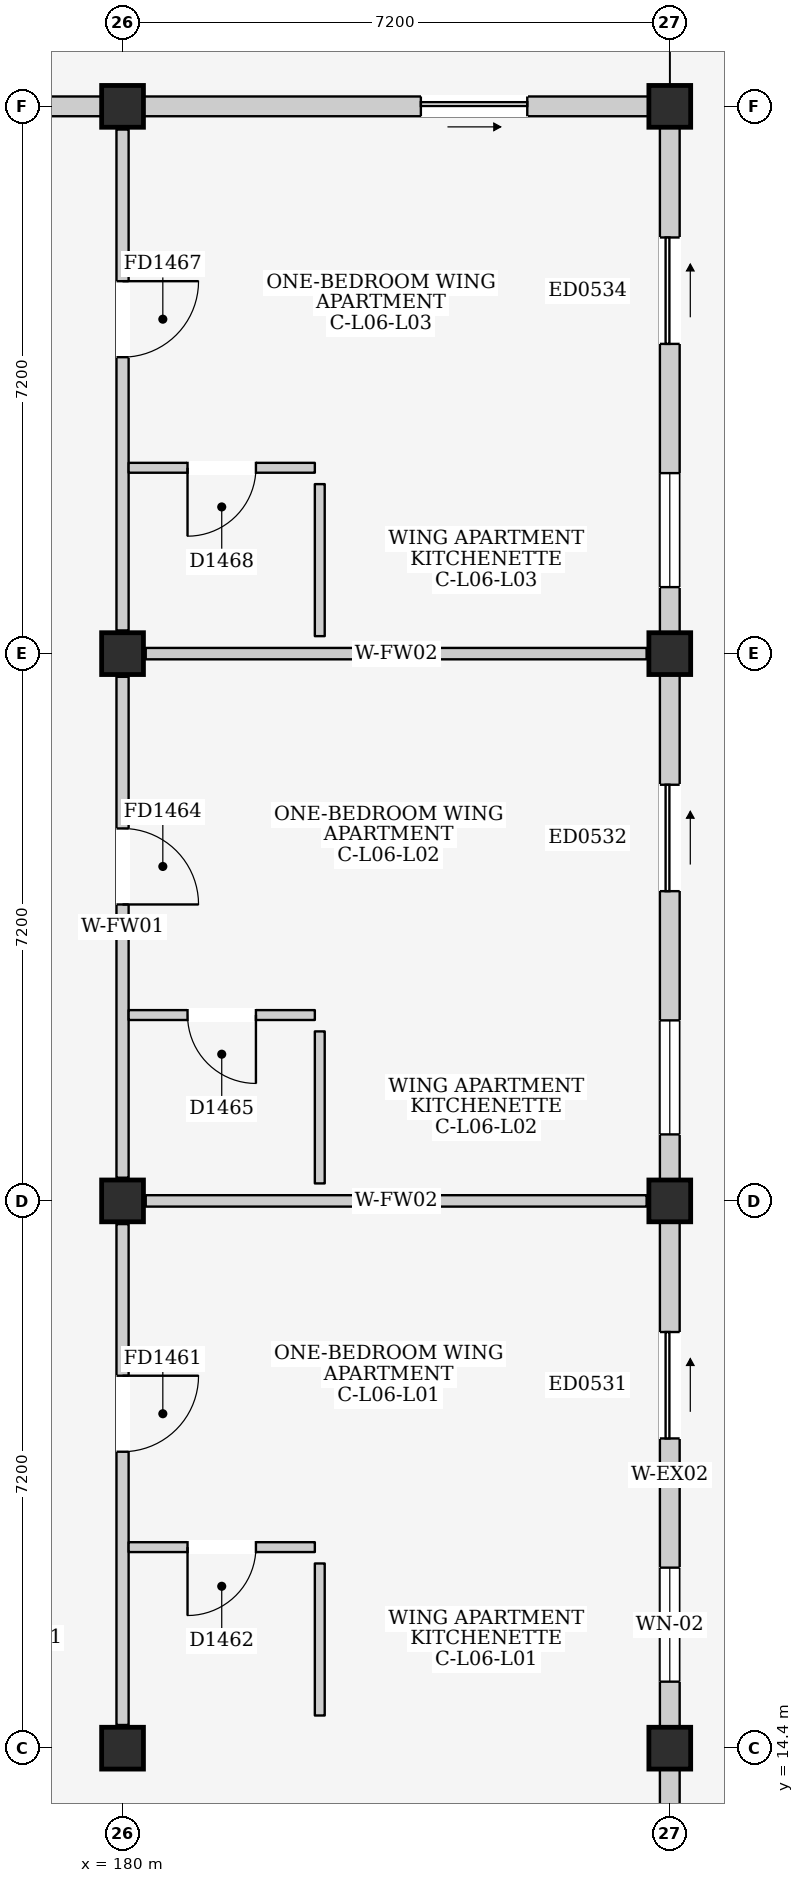
"""IFC4 building model, lengths in metres.
Left out: names, types, materials, properties, quantities, classifications, styles, units other than length and angle.
Written with IfcOpenShell. Run it as: python <this file> out.ifc"""

import sys

from ifc_helpers import new_model, si_unit, direction, frame, frame_2d, origin, origin_2d, place, context, subcontext, project, spatial, rectangle, extrude, element, fill, save


model = new_model("IFC4")
c1 = context("Model", 3, precision=1e-05, world=origin(), true_north=direction((0.0, 1.0)))
c2 = subcontext(c1, "Body", "Model", "MODEL_VIEW")
j1 = project(units=[si_unit("LENGTHUNIT", "METRE"), si_unit("PLANEANGLEUNIT", "RADIAN")], contexts=[c1])
p1 = place(None, origin())
s1 = spatial("IfcSite", under=j1, at=p1, CompositionType="ELEMENT")
p2 = place(p1, origin())
s2 = spatial("IfcBuilding", under=s1, at=p2, CompositionType="ELEMENT")
p3 = place(p2, frame((0.0, 0.0, 21.9)))
s3 = spatial("IfcBuildingStorey", under=s2, at=p3, CompositionType="ELEMENT", Elevation=21.9)
for number, where, z_axis, x_axis in (
    (1, (180.0, 14.4, 0.0), (0.0, 0.0, 1.0), (1.0, 0.0, 0.0)),
    (2, (180.0, 21.6, 0.0), (0.0, 0.0, 1.0), (1.0, 0.0, 0.0)),
    (3, (180.0, 28.8, 0.0), (0.0, 0.0, 1.0), (1.0, 0.0, 0.0)),
    (4, (180.0, 36.0, 0.0), (0.0, 0.0, 1.0), (1.0, 0.0, 0.0)),
    (5, (187.2, 14.4, 0.0), (0.0, 0.0, 1.0), (1.0, 0.0, 0.0)),
    (6, (187.2, 21.6, 0.0), (0.0, 0.0, 1.0), (1.0, 0.0, 0.0)),
    (7, (187.2, 28.8, 0.0), (0.0, 0.0, 1.0), (1.0, 0.0, 0.0)),
    (8, (187.2, 36.0, 0.0), (0.0, 0.0, 1.0), (1.0, 0.0, 0.0)),
):
    element("IfcColumn", number, at=place(p3, frame(where, z_axis=z_axis, x_axis=x_axis)), inside=s3, PredefinedType="COLUMN", context=c2, shape_type="SweptSolid", body=[
        extrude(rectangle(XDim=0.55, YDim=0.55, at=origin_2d()), origin(), (0.0, 0.0, 1.0), 3.2),
    ])
p4 = place(p3, frame((173.075, 36.0, 0.0), z_axis=(0.0, 0.0, 1.0), x_axis=(1.0, 0.0, 0.0)))
e9 = element("IfcWall", 9, at=p4, inside=s3, PredefinedType="ELEMENTEDWALL", context=c2, shape_type="SweptSolid", body=[
    extrude(rectangle(XDim=6.65, YDim=0.26, at=frame_2d((3.325, 0.0))), origin(), (0.0, 0.0, 1.0), 2.365),
])
p5 = place(p4, frame((2.825, 0.0, 1.1)))
e10 = element("IfcOpeningElement", 10, at=p5, cuts=e9, PredefinedType="OPENING", context=c2, shape_type="SweptSolid", body=[
    extrude(rectangle(XDim=1.0, YDim=0.9, at=frame_2d((0.5, 0.45))), frame((0.0, 0.145, 0.0), z_axis=(0.0, -1.0, 0.0), x_axis=(1.0, 0.0, 0.0)), (0.0, 0.0, 1.0), 0.29),
])
p6 = place(p3, frame((187.2, 7.475, 0.0), z_axis=(0.0, 0.0, 1.0), x_axis=(0.0, 1.0, 0.0)))
e11 = element("IfcWall", 11, at=p6, inside=s3, PredefinedType="ELEMENTEDWALL", context=c2, shape_type="SweptSolid", body=[
    extrude(rectangle(XDim=6.65, YDim=0.26, at=frame_2d((3.325, 0.0))), origin(), (0.0, 0.0, 1.0), 2.515),
])
p7 = place(p6, frame((3.65, 0.0, 0.0)))
e12 = element("IfcOpeningElement", 12, at=p7, cuts=e11, PredefinedType="OPENING", context=c2, shape_type="SweptSolid", body=[
    extrude(rectangle(XDim=1.4, YDim=2.1, at=frame_2d((0.7, 1.05))), frame((0.0, 0.145, 0.0), z_axis=(0.0, -1.0, 0.0), x_axis=(1.0, 0.0, 0.0)), (0.0, 0.0, 1.0), 0.29),
])
p8 = place(p3, frame((187.2, 14.675, 0.0), z_axis=(0.0, 0.0, 1.0), x_axis=(0.0, 1.0, 0.0)))
e13 = element("IfcWall", 13, at=p8, inside=s3, PredefinedType="ELEMENTEDWALL", context=c2, shape_type="SweptSolid", body=[
    extrude(rectangle(XDim=6.65, YDim=0.26, at=frame_2d((3.325, 0.0))), origin(), (0.0, 0.0, 1.0), 2.515),
])
p9 = place(p8, frame((3.8, 0.0, 0.0)))
e14 = element("IfcOpeningElement", 14, at=p9, cuts=e13, PredefinedType="OPENING", context=c2, shape_type="SweptSolid", body=[
    extrude(rectangle(XDim=1.4, YDim=2.1, at=frame_2d((0.7, 1.05))), frame((0.0, 0.145, 0.0), z_axis=(0.0, -1.0, 0.0), x_axis=(1.0, 0.0, 0.0)), (0.0, 0.0, 1.0), 0.29),
])
p10 = place(p8, frame((0.6, 0.0, 0.905)))
e15 = element("IfcOpeningElement", 15, at=p10, cuts=e13, PredefinedType="OPENING", context=c2, shape_type="SweptSolid", body=[
    extrude(rectangle(XDim=1.5, YDim=1.5, at=frame_2d((0.75, 0.75))), frame((0.0, 0.145, 0.0), z_axis=(0.0, -1.0, 0.0), x_axis=(1.0, 0.0, 0.0)), (0.0, 0.0, 1.0), 0.29),
])
p11 = place(p3, frame((187.2, 21.875, 0.0), z_axis=(0.0, 0.0, 1.0), x_axis=(0.0, 1.0, 0.0)))
e16 = element("IfcWall", 16, at=p11, inside=s3, PredefinedType="ELEMENTEDWALL", context=c2, shape_type="SweptSolid", body=[
    extrude(rectangle(XDim=6.65, YDim=0.26, at=frame_2d((3.325, 0.0))), origin(), (0.0, 0.0, 1.0), 2.515),
])
p12 = place(p11, frame((3.8, 0.0, 0.0)))
e17 = element("IfcOpeningElement", 17, at=p12, cuts=e16, PredefinedType="OPENING", context=c2, shape_type="SweptSolid", body=[
    extrude(rectangle(XDim=1.4, YDim=2.1, at=frame_2d((0.7, 1.05))), frame((0.0, 0.145, 0.0), z_axis=(0.0, -1.0, 0.0), x_axis=(1.0, 0.0, 0.0)), (0.0, 0.0, 1.0), 0.29),
])
p13 = place(p11, frame((0.6, 0.0, 0.905)))
e18 = element("IfcOpeningElement", 18, at=p13, cuts=e16, PredefinedType="OPENING", context=c2, shape_type="SweptSolid", body=[
    extrude(rectangle(XDim=1.5, YDim=1.5, at=frame_2d((0.75, 0.75))), frame((0.0, 0.145, 0.0), z_axis=(0.0, -1.0, 0.0), x_axis=(1.0, 0.0, 0.0)), (0.0, 0.0, 1.0), 0.29),
])
p14 = place(p3, frame((180.275, 36.0, 0.0), z_axis=(0.0, 0.0, 1.0), x_axis=(1.0, 0.0, 0.0)))
e19 = element("IfcWall", 19, at=p14, inside=s3, PredefinedType="ELEMENTEDWALL", context=c2, shape_type="SweptSolid", body=[
    extrude(rectangle(XDim=6.65, YDim=0.26, at=frame_2d((3.325, 0.0))), origin(), (0.0, 0.0, 1.0), 2.365),
])
p15 = place(p14, frame((3.65, 0.0, 0.0)))
e20 = element("IfcOpeningElement", 20, at=p15, cuts=e19, PredefinedType="OPENING", context=c2, shape_type="SweptSolid", body=[
    extrude(rectangle(XDim=1.4, YDim=2.1, at=frame_2d((0.7, 1.05))), frame((0.0, 0.145, 0.0), z_axis=(0.0, -1.0, 0.0), x_axis=(1.0, 0.0, 0.0)), (0.0, 0.0, 1.0), 0.29),
])
p16 = place(p3, frame((187.2, 29.075, 0.0), z_axis=(0.0, 0.0, 1.0), x_axis=(0.0, 1.0, 0.0)))
e21 = element("IfcWall", 21, at=p16, inside=s3, PredefinedType="ELEMENTEDWALL", context=c2, shape_type="SweptSolid", body=[
    extrude(rectangle(XDim=6.65, YDim=0.26, at=frame_2d((3.325, 0.0))), origin(), (0.0, 0.0, 1.0), 2.515),
])
p17 = place(p16, frame((3.8, 0.0, 0.0)))
e22 = element("IfcOpeningElement", 22, at=p17, cuts=e21, PredefinedType="OPENING", context=c2, shape_type="SweptSolid", body=[
    extrude(rectangle(XDim=1.4, YDim=2.1, at=frame_2d((0.7, 1.05))), frame((0.0, 0.145, 0.0), z_axis=(0.0, -1.0, 0.0), x_axis=(1.0, 0.0, 0.0)), (0.0, 0.0, 1.0), 0.29),
])
p18 = place(p16, frame((0.6, 0.0, 0.905)))
e23 = element("IfcOpeningElement", 23, at=p18, cuts=e21, PredefinedType="OPENING", context=c2, shape_type="SweptSolid", body=[
    extrude(rectangle(XDim=1.5, YDim=1.5, at=frame_2d((0.75, 0.75))), frame((0.0, 0.145, 0.0), z_axis=(0.0, -1.0, 0.0), x_axis=(1.0, 0.0, 0.0)), (0.0, 0.0, 1.0), 0.29),
])
p19 = place(p3, frame((180.0, 14.705, 0.0), z_axis=(0.0, 0.0, 1.0), x_axis=(0.0, 1.0, 0.0)))
e24 = element("IfcWall", 24, at=p19, inside=s3, PredefinedType="PARTITIONING", context=c2, shape_type="SweptSolid", body=[
    extrude(rectangle(XDim=6.59, YDim=0.16, at=frame_2d((3.295, 0.0))), origin(), (0.0, 0.0, 1.0), 2.465),
])
p20 = place(p19, frame((3.595, 0.0, 0.0)))
e25 = element("IfcOpeningElement", 25, at=p20, cuts=e24, PredefinedType="OPENING", context=c2, shape_type="SweptSolid", body=[
    extrude(rectangle(XDim=1.0, YDim=2.15, at=frame_2d((0.5, 1.075))), frame((0.0, 0.095, 0.0), z_axis=(0.0, -1.0, 0.0), x_axis=(1.0, 0.0, 0.0)), (0.0, 0.0, 1.0), 0.19),
])
p21 = place(p3, frame((180.305, 21.6, 0.0), z_axis=(0.0, 0.0, 1.0), x_axis=(1.0, 0.0, 0.0)))
e26 = element("IfcWall", 26, at=p21, inside=s3, PredefinedType="PARTITIONING", context=c2, shape_type="SweptSolid", body=[
    extrude(rectangle(XDim=6.59, YDim=0.15, at=frame_2d((3.295, 0.0))), origin(), (0.0, 0.0, 1.0), 2.365),
])
p22 = place(p3, frame((180.08, 17.045, 0.0), z_axis=(0.0, 0.0, 1.0), x_axis=(1.0, 0.0, 0.0)))
e27 = element("IfcWall", 27, at=p22, inside=s3, PredefinedType="PARTITIONING", context=c2, shape_type="SweptSolid", body=[
    extrude(rectangle(XDim=2.45, YDim=0.13, at=frame_2d((1.225, 0.0))), origin(), (0.0, 0.0, 1.0), 2.98),
])
p23 = place(p22, frame((0.775, 0.0, 0.0)))
e28 = element("IfcOpeningElement", 28, at=p23, cuts=e27, PredefinedType="OPENING", context=c2, shape_type="SweptSolid", body=[
    extrude(rectangle(XDim=0.9, YDim=2.1, at=frame_2d((0.45, 1.05))), frame((0.0, 0.08, 0.0), z_axis=(0.0, -1.0, 0.0), x_axis=(1.0, 0.0, 0.0)), (0.0, 0.0, 1.0), 0.16),
])
p24 = place(p3, frame((182.595, 14.83, 0.0), z_axis=(0.0, 0.0, 1.0), x_axis=(0.0, 1.0, 0.0)))
e29 = element("IfcWall", 29, at=p24, inside=s3, PredefinedType="PARTITIONING", context=c2, shape_type="SweptSolid", body=[
    extrude(rectangle(XDim=2.0, YDim=0.13, at=frame_2d((1.0, 0.0))), origin(), (0.0, 0.0, 1.0), 2.98),
])
p25 = place(p3, frame((180.0, 21.905, 0.0), z_axis=(0.0, 0.0, 1.0), x_axis=(0.0, 1.0, 0.0)))
e30 = element("IfcWall", 30, at=p25, inside=s3, PredefinedType="PARTITIONING", context=c2, shape_type="SweptSolid", body=[
    extrude(rectangle(XDim=6.59, YDim=0.16, at=frame_2d((3.295, 0.0))), origin(), (0.0, 0.0, 1.0), 2.465),
])
p26 = place(p25, frame((3.595, 0.0, 0.0)))
e31 = element("IfcOpeningElement", 31, at=p26, cuts=e30, PredefinedType="OPENING", context=c2, shape_type="SweptSolid", body=[
    extrude(rectangle(XDim=1.0, YDim=2.15, at=frame_2d((0.5, 1.075))), frame((0.0, 0.095, 0.0), z_axis=(0.0, -1.0, 0.0), x_axis=(1.0, 0.0, 0.0)), (0.0, 0.0, 1.0), 0.19),
])
p27 = place(p3, frame((180.305, 28.8, 0.0), z_axis=(0.0, 0.0, 1.0), x_axis=(1.0, 0.0, 0.0)))
e32 = element("IfcWall", 32, at=p27, inside=s3, PredefinedType="PARTITIONING", context=c2, shape_type="SweptSolid", body=[
    extrude(rectangle(XDim=6.59, YDim=0.15, at=frame_2d((3.295, 0.0))), origin(), (0.0, 0.0, 1.0), 2.365),
])
p28 = place(p3, frame((180.08, 24.045, 0.0), z_axis=(0.0, 0.0, 1.0), x_axis=(1.0, 0.0, 0.0)))
e33 = element("IfcWall", 33, at=p28, inside=s3, PredefinedType="PARTITIONING", context=c2, shape_type="SweptSolid", body=[
    extrude(rectangle(XDim=2.45, YDim=0.13, at=frame_2d((1.225, 0.0))), origin(), (0.0, 0.0, 1.0), 2.98),
])
p29 = place(p28, frame((0.775, 0.0, 0.0)))
e34 = element("IfcOpeningElement", 34, at=p29, cuts=e33, PredefinedType="OPENING", context=c2, shape_type="SweptSolid", body=[
    extrude(rectangle(XDim=0.9, YDim=2.1, at=frame_2d((0.45, 1.05))), frame((0.0, 0.08, 0.0), z_axis=(0.0, -1.0, 0.0), x_axis=(1.0, 0.0, 0.0)), (0.0, 0.0, 1.0), 0.16),
])
p30 = place(p3, frame((182.595, 21.83, 0.0), z_axis=(0.0, 0.0, 1.0), x_axis=(0.0, 1.0, 0.0)))
e35 = element("IfcWall", 35, at=p30, inside=s3, PredefinedType="PARTITIONING", context=c2, shape_type="SweptSolid", body=[
    extrude(rectangle(XDim=2.0, YDim=0.13, at=frame_2d((1.0, 0.0))), origin(), (0.0, 0.0, 1.0), 2.98),
])
p31 = place(p3, frame((180.0, 29.105, 0.0), z_axis=(0.0, 0.0, 1.0), x_axis=(0.0, 1.0, 0.0)))
e36 = element("IfcWall", 36, at=p31, inside=s3, PredefinedType="PARTITIONING", context=c2, shape_type="SweptSolid", body=[
    extrude(rectangle(XDim=6.59, YDim=0.16, at=frame_2d((3.295, 0.0))), origin(), (0.0, 0.0, 1.0), 2.465),
])
p32 = place(p31, frame((3.595, 0.0, 0.0)))
e37 = element("IfcOpeningElement", 37, at=p32, cuts=e36, PredefinedType="OPENING", context=c2, shape_type="SweptSolid", body=[
    extrude(rectangle(XDim=1.0, YDim=2.15, at=frame_2d((0.5, 1.075))), frame((0.0, 0.095, 0.0), z_axis=(0.0, -1.0, 0.0), x_axis=(1.0, 0.0, 0.0)), (0.0, 0.0, 1.0), 0.19),
])
p33 = place(p3, frame((180.08, 31.245, 0.0), z_axis=(0.0, 0.0, 1.0), x_axis=(1.0, 0.0, 0.0)))
e38 = element("IfcWall", 38, at=p33, inside=s3, PredefinedType="PARTITIONING", context=c2, shape_type="SweptSolid", body=[
    extrude(rectangle(XDim=2.45, YDim=0.13, at=frame_2d((1.225, 0.0))), origin(), (0.0, 0.0, 1.0), 2.98),
])
p34 = place(p33, frame((0.775, 0.0, 0.0)))
e39 = element("IfcOpeningElement", 39, at=p34, cuts=e38, PredefinedType="OPENING", context=c2, shape_type="SweptSolid", body=[
    extrude(rectangle(XDim=0.9, YDim=2.1, at=frame_2d((0.45, 1.05))), frame((0.0, 0.08, 0.0), z_axis=(0.0, -1.0, 0.0), x_axis=(1.0, 0.0, 0.0)), (0.0, 0.0, 1.0), 0.16),
])
p35 = place(p3, frame((182.595, 29.03, 0.0), z_axis=(0.0, 0.0, 1.0), x_axis=(0.0, 1.0, 0.0)))
e40 = element("IfcWall", 40, at=p35, inside=s3, PredefinedType="PARTITIONING", context=c2, shape_type="SweptSolid", body=[
    extrude(rectangle(XDim=2.0, YDim=0.13, at=frame_2d((1.0, 0.0))), origin(), (0.0, 0.0, 1.0), 2.98),
])
p36 = place(p9, frame((1.4, 0.0, 0.0), z_axis=(0.0, 0.0, 1.0), x_axis=(-1.0, 0.0, 0.0)))
e41 = element("IfcDoor", 41, at=p36, inside=s3, OperationType="SLIDING_TO_RIGHT", PredefinedType="DOOR", context=c2, shape_type="SweptSolid", body=[
    extrude(rectangle(XDim=1.4, YDim=2.1, at=frame_2d((0.7, 1.05))), frame((0.0, 0.025, 0.0), z_axis=(0.0, -1.0, 0.0), x_axis=(1.0, 0.0, 0.0)), (0.0, 0.0, 1.0), 0.05),
])
fill(e14, e41)
p37 = place(p10, origin())
e42 = element("IfcWindow", 42, at=p37, inside=s3, PartitioningType="DOUBLE_PANEL_VERTICAL", PredefinedType="WINDOW", context=c2, shape_type="SweptSolid", body=[
    extrude(rectangle(XDim=1.5, YDim=1.5, at=frame_2d((0.75, 0.75))), frame((0.0, 0.03, 0.0), z_axis=(0.0, -1.0, 0.0), x_axis=(1.0, 0.0, 0.0)), (0.0, 0.0, 1.0), 0.06),
])
fill(e15, e42)
p38 = place(p12, frame((1.4, 0.0, 0.0), z_axis=(0.0, 0.0, 1.0), x_axis=(-1.0, 0.0, 0.0)))
e43 = element("IfcDoor", 43, at=p38, inside=s3, OperationType="SLIDING_TO_RIGHT", PredefinedType="DOOR", context=c2, shape_type="SweptSolid", body=[
    extrude(rectangle(XDim=1.4, YDim=2.1, at=frame_2d((0.7, 1.05))), frame((0.0, 0.025, 0.0), z_axis=(0.0, -1.0, 0.0), x_axis=(1.0, 0.0, 0.0)), (0.0, 0.0, 1.0), 0.05),
])
fill(e17, e43)
p39 = place(p13, origin())
e44 = element("IfcWindow", 44, at=p39, inside=s3, PartitioningType="DOUBLE_PANEL_VERTICAL", PredefinedType="WINDOW", context=c2, shape_type="SweptSolid", body=[
    extrude(rectangle(XDim=1.5, YDim=1.5, at=frame_2d((0.75, 0.75))), frame((0.0, 0.03, 0.0), z_axis=(0.0, -1.0, 0.0), x_axis=(1.0, 0.0, 0.0)), (0.0, 0.0, 1.0), 0.06),
])
fill(e18, e44)
p40 = place(p15, frame((1.4, 0.0, 0.0), z_axis=(0.0, 0.0, 1.0), x_axis=(-1.0, 0.0, 0.0)))
e45 = element("IfcDoor", 45, at=p40, inside=s3, OperationType="SLIDING_TO_RIGHT", PredefinedType="DOOR", context=c2, shape_type="SweptSolid", body=[
    extrude(rectangle(XDim=1.4, YDim=2.1, at=frame_2d((0.7, 1.05))), frame((0.0, 0.025, 0.0), z_axis=(0.0, -1.0, 0.0), x_axis=(1.0, 0.0, 0.0)), (0.0, 0.0, 1.0), 0.05),
])
fill(e20, e45)
p41 = place(p17, frame((1.4, 0.0, 0.0), z_axis=(0.0, 0.0, 1.0), x_axis=(-1.0, 0.0, 0.0)))
e46 = element("IfcDoor", 46, at=p41, inside=s3, OperationType="SLIDING_TO_RIGHT", PredefinedType="DOOR", context=c2, shape_type="SweptSolid", body=[
    extrude(rectangle(XDim=1.4, YDim=2.1, at=frame_2d((0.7, 1.05))), frame((0.0, 0.025, 0.0), z_axis=(0.0, -1.0, 0.0), x_axis=(1.0, 0.0, 0.0)), (0.0, 0.0, 1.0), 0.05),
])
fill(e22, e46)
p42 = place(p18, origin())
e47 = element("IfcWindow", 47, at=p42, inside=s3, PartitioningType="DOUBLE_PANEL_VERTICAL", PredefinedType="WINDOW", context=c2, shape_type="SweptSolid", body=[
    extrude(rectangle(XDim=1.5, YDim=1.5, at=frame_2d((0.75, 0.75))), frame((0.0, 0.03, 0.0), z_axis=(0.0, -1.0, 0.0), x_axis=(1.0, 0.0, 0.0)), (0.0, 0.0, 1.0), 0.06),
])
fill(e23, e47)
p43 = place(p20, frame((1.0, 0.0, 0.0), z_axis=(0.0, 0.0, 1.0), x_axis=(-1.0, 0.0, 0.0)))
e48 = element("IfcDoor", 48, at=p43, inside=s3, OperationType="SINGLE_SWING_LEFT", PredefinedType="DOOR", context=c2, shape_type="SweptSolid", body=[
    extrude(rectangle(XDim=1.0, YDim=2.15, at=frame_2d((0.5, 1.075))), frame((0.0, 0.025, 0.0), z_axis=(0.0, -1.0, 0.0), x_axis=(1.0, 0.0, 0.0)), (0.0, 0.0, 1.0), 0.05),
])
fill(e25, e48)
p44 = place(p23, frame((0.9, 0.0, 0.0), z_axis=(0.0, 0.0, 1.0), x_axis=(-1.0, 0.0, 0.0)))
e49 = element("IfcDoor", 49, at=p44, inside=s3, OperationType="SINGLE_SWING_RIGHT", PredefinedType="DOOR", context=c2, shape_type="SweptSolid", body=[
    extrude(rectangle(XDim=0.9, YDim=2.1, at=frame_2d((0.45, 1.05))), frame((0.0, 0.025, 0.0), z_axis=(0.0, -1.0, 0.0), x_axis=(1.0, 0.0, 0.0)), (0.0, 0.0, 1.0), 0.05),
])
fill(e28, e49)
p45 = place(p26, frame((1.0, 0.0, 0.0), z_axis=(0.0, 0.0, 1.0), x_axis=(-1.0, 0.0, 0.0)))
e50 = element("IfcDoor", 50, at=p45, inside=s3, OperationType="SINGLE_SWING_RIGHT", PredefinedType="DOOR", context=c2, shape_type="SweptSolid", body=[
    extrude(rectangle(XDim=1.0, YDim=2.15, at=frame_2d((0.5, 1.075))), frame((0.0, 0.025, 0.0), z_axis=(0.0, -1.0, 0.0), x_axis=(1.0, 0.0, 0.0)), (0.0, 0.0, 1.0), 0.05),
])
fill(e31, e50)
p46 = place(p29, frame((0.9, 0.0, 0.0), z_axis=(0.0, 0.0, 1.0), x_axis=(-1.0, 0.0, 0.0)))
e51 = element("IfcDoor", 51, at=p46, inside=s3, OperationType="SINGLE_SWING_LEFT", PredefinedType="DOOR", context=c2, shape_type="SweptSolid", body=[
    extrude(rectangle(XDim=0.9, YDim=2.1, at=frame_2d((0.45, 1.05))), frame((0.0, 0.025, 0.0), z_axis=(0.0, -1.0, 0.0), x_axis=(1.0, 0.0, 0.0)), (0.0, 0.0, 1.0), 0.05),
])
fill(e34, e51)
p47 = place(p32, frame((1.0, 0.0, 0.0), z_axis=(0.0, 0.0, 1.0), x_axis=(-1.0, 0.0, 0.0)))
e52 = element("IfcDoor", 52, at=p47, inside=s3, OperationType="SINGLE_SWING_LEFT", PredefinedType="DOOR", context=c2, shape_type="SweptSolid", body=[
    extrude(rectangle(XDim=1.0, YDim=2.15, at=frame_2d((0.5, 1.075))), frame((0.0, 0.025, 0.0), z_axis=(0.0, -1.0, 0.0), x_axis=(1.0, 0.0, 0.0)), (0.0, 0.0, 1.0), 0.05),
])
fill(e37, e52)
p48 = place(p34, frame((0.9, 0.0, 0.0), z_axis=(0.0, 0.0, 1.0), x_axis=(-1.0, 0.0, 0.0)))
e53 = element("IfcDoor", 53, at=p48, inside=s3, OperationType="SINGLE_SWING_RIGHT", PredefinedType="DOOR", context=c2, shape_type="SweptSolid", body=[
    extrude(rectangle(XDim=0.9, YDim=2.1, at=frame_2d((0.45, 1.05))), frame((0.0, 0.025, 0.0), z_axis=(0.0, -1.0, 0.0), x_axis=(1.0, 0.0, 0.0)), (0.0, 0.0, 1.0), 0.05),
])
fill(e39, e53)
save(model, sys.argv[1])
